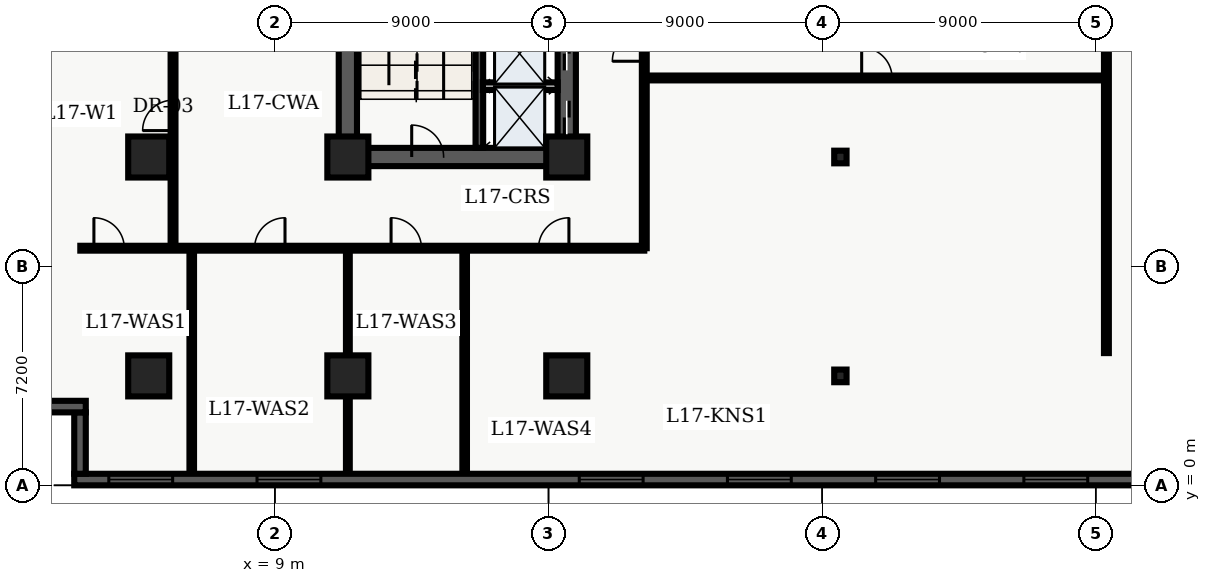
"""IFC4 building model, lengths in metres.
Left out: names, types, materials, properties, quantities, classifications, styles, units other than length and angle.
Written with IfcOpenShell. Run it as: python <this file> out.ifc"""

import sys

from ifc_helpers import new_model, entity, si_unit, converted_unit, direction, frame, origin_with_axes, origin_2d_with_axis, place, context, subcontext, project, spatial, polyline, rectangle, i_section, outline, extrude, element, fill, save


model = new_model("IFC4")
c1 = context("Model", 3, precision=1e-05, world=origin_with_axes(), true_north=direction((0.0, 1.0)))
c2 = subcontext(c1, "Body", "Model", "MODEL_VIEW")
j1 = project(units=[si_unit("LENGTHUNIT", "METRE"), converted_unit("PLANEANGLEUNIT", "DEGREE", entity("IfcPlaneAngleMeasure", 0.017), si_unit("PLANEANGLEUNIT", "RADIAN"), dimensions=[0, 0, 0, 0, 0, 0, 0])], contexts=[c1])
p1 = place(None, origin_with_axes())
s1 = spatial("IfcSite", under=j1, at=p1, CompositionType="ELEMENT")
p2 = place(p1, origin_with_axes())
s2 = spatial("IfcBuilding", under=s1, at=p2, CompositionType="ELEMENT")
p3 = place(p2, frame((0.0, 0.0, 71.7), z_axis=(0.0, 0.0, 1.0), x_axis=(1.0, 0.0, 0.0)))
s3 = spatial("IfcBuildingStorey", under=s2, at=p3, CompositionType="ELEMENT", Elevation=71.7)
p4 = place(p3, frame((11.4, 10.8, 0.0), z_axis=(0.0, 0.0, 1.0), x_axis=(0.0, 1.0, 0.0)))
e1 = element("IfcWall", 1, at=p4, inside=s3, PredefinedType="SHEAR", context=c2, shape_type="SweptSolid", body=[
    extrude(outline(polyline([(0.0, -0.3), (27.0, -0.3), (27.0, 0.3), (0.0, 0.3), (0.0, -0.3)])), origin_with_axes(), (0.0, 0.0, 1.0), 3.66),
])
p5 = place(p3, frame((11.4, 10.8, 0.0), z_axis=(0.0, 0.0, 1.0), x_axis=(1.0, 0.0, 0.0)))
e2 = element("IfcWall", 2, at=p5, inside=s3, PredefinedType="SHEAR", context=c2, shape_type="SweptSolid", body=[
    extrude(outline(polyline([(0.0, -0.3), (7.2, -0.3), (7.2, 0.3), (0.0, 0.3), (0.0, -0.3)])), origin_with_axes(), (0.0, 0.0, 1.0), 3.66),
])
p6 = place(p5, frame((2.625, 0.0, 0.0), z_axis=(0.0, 0.0, 1.0), x_axis=(1.0, 0.0, 0.0)))
e3 = element("IfcOpeningElement", 3, at=p6, cuts=e2, PredefinedType="OPENING", context=c2, shape_type="SweptSolid", body=[
    extrude(rectangle(XDim=1.05, YDim=0.62, at=origin_2d_with_axis()), origin_with_axes(), (0.0, 0.0, 1.0), 2.15),
])
p7 = place(p3, frame((18.6, 10.8, 0.0), z_axis=(0.0, 0.0, 1.0), x_axis=(0.0, 1.0, 0.0)))
e4 = element("IfcWall", 4, at=p7, inside=s3, PredefinedType="SHEAR", context=c2, shape_type="SweptSolid", body=[
    extrude(outline(polyline([(0.0, -0.3), (13.5, -0.3), (13.5, 0.3), (0.0, 0.3), (0.0, -0.3)])), origin_with_axes(), (0.0, 0.0, 1.0), 3.66),
])
p8 = place(p7, frame((1.3, 0.0, 0.0), z_axis=(0.0, 0.0, 1.0), x_axis=(1.0, 0.0, 0.0)))
e5 = element("IfcOpeningElement", 5, at=p8, cuts=e4, PredefinedType="OPENING", context=c2, shape_type="SweptSolid", body=[
    extrude(rectangle(XDim=1.1, YDim=0.62, at=origin_2d_with_axis()), origin_with_axes(), (0.0, 0.0, 1.0), 2.15),
])
p9 = place(p7, frame((3.4, 0.0, 0.0), z_axis=(0.0, 0.0, 1.0), x_axis=(1.0, 0.0, 0.0)))
e6 = element("IfcOpeningElement", 6, at=p9, cuts=e4, PredefinedType="OPENING", context=c2, shape_type="SweptSolid", body=[
    extrude(rectangle(XDim=1.1, YDim=0.62, at=origin_2d_with_axis()), origin_with_axes(), (0.0, 0.0, 1.0), 2.15),
])
p10 = place(p7, frame((11.125, 0.0, 0.0), z_axis=(0.0, 0.0, 1.0), x_axis=(1.0, 0.0, 0.0)))
e7 = element("IfcOpeningElement", 7, at=p10, cuts=e4, PredefinedType="OPENING", context=c2, shape_type="SweptSolid", body=[
    extrude(rectangle(XDim=1.05, YDim=0.62, at=origin_2d_with_axis()), origin_with_axes(), (0.0, 0.0, 1.0), 2.15),
])
p11 = place(p3, frame((15.725, 11.1, 0.0), z_axis=(0.0, 0.0, 1.0), x_axis=(0.0, 1.0, 0.0)))
e8 = element("IfcWall", 8, at=p11, inside=s3, PredefinedType="SHEAR", context=c2, shape_type="SweptSolid", body=[
    extrude(outline(polyline([(0.0, -0.125), (8.6, -0.125), (8.6, 0.125), (0.0, 0.125), (0.0, -0.125)])), origin_with_axes(), (0.0, 0.0, 1.0), 3.66),
])
for number, where, z_axis, x_axis in (
    (9, (11.4, 3.6, 0.0), (0.0, 0.0, 1.0), (1.0, 0.0, 0.0)),
    (10, (11.4, 10.8, 0.0), (0.0, 0.0, 1.0), (1.0, 0.0, 0.0)),
    (11, (18.6, 3.6, 0.0), (0.0, 0.0, 1.0), (1.0, 0.0, 0.0)),
    (12, (18.6, 10.8, 0.0), (0.0, 0.0, 1.0), (1.0, 0.0, 0.0)),
    (13, (4.85, 3.6, 0.0), (0.0, 0.0, 1.0), (1.0, 0.0, 0.0)),
    (14, (4.85, 10.8, 0.0), (0.0, 0.0, 1.0), (1.0, 0.0, 0.0)),
):
    element("IfcColumn", number, at=place(p3, frame(where, z_axis=z_axis, x_axis=x_axis)), inside=s3, PredefinedType="COLUMN", context=c2, shape_type="SweptSolid", body=[
        extrude(rectangle(XDim=1.35, YDim=1.35, at=origin_2d_with_axis()), origin_with_axes(), (0.0, 0.0, 1.0), 3.9),
    ])
for number, where, z_axis, x_axis in (
    (15, (27.6, 3.6, 0.0), (0.0, 0.0, 1.0), (1.0, 0.0, 0.0)),
    (16, (27.6, 10.8, 0.0), (0.0, 0.0, 1.0), (1.0, 0.0, 0.0)),
):
    element("IfcColumn", number, at=place(p3, frame(where, z_axis=z_axis, x_axis=x_axis)), inside=s3, PredefinedType="COLUMN", context=c2, shape_type="SweptSolid", body=[
        extrude(i_section(OverallWidth=0.406, OverallDepth=0.416, WebThickness=0.03, FlangeThickness=0.048, FilletRadius=0.022, at=origin_2d_with_axis()), origin_with_axes(), (0.0, 0.0, 1.0), 3.9),
    ])
p12 = place(p3, frame((15.84, 13.13, 0.0), z_axis=(0.0, 0.0, 1.0), x_axis=(1.0, 0.0, 0.0)))
e17 = element("IfcWall", 17, at=p12, inside=s3, PredefinedType="SOLIDWALL", context=c2, shape_type="SweptSolid", body=[
    extrude(outline(polyline([(0.0, -0.125), (2.46, -0.125), (2.46, 0.125), (0.0, 0.125), (0.0, -0.125)])), origin_with_axes(), (0.0, 0.0, 1.0), 2.7),
])
p13 = place(p3, frame((2.6, 7.8, 0.0), z_axis=(0.0, 0.0, 1.0), x_axis=(1.0, 0.0, 0.0)))
e18 = element("IfcWall", 18, at=p13, inside=s3, PredefinedType="PARTITIONING", context=c2, shape_type="SweptSolid", body=[
    extrude(outline(polyline([(0.0, -0.08), (18.55, -0.08), (18.55, 0.08), (0.0, 0.08), (0.0, -0.08)])), origin_with_axes(), (0.0, 0.0, 1.0), 2.7),
])
p14 = place(p13, frame((0.947, 0.0, 0.0), z_axis=(0.0, 0.0, 1.0), x_axis=(1.0, 0.0, 0.0)))
e19 = element("IfcOpeningElement", 19, at=p14, cuts=e18, PredefinedType="OPENING", context=c2, shape_type="SweptSolid", body=[
    extrude(rectangle(XDim=1.0, YDim=0.18, at=origin_2d_with_axis()), origin_with_axes(), (0.0, 0.0, 1.0), 2.15),
])
p15 = place(p13, frame((6.232, 0.0, 0.0), z_axis=(0.0, 0.0, 1.0), x_axis=(1.0, 0.0, 0.0)))
e20 = element("IfcOpeningElement", 20, at=p15, cuts=e18, PredefinedType="OPENING", context=c2, shape_type="SweptSolid", body=[
    extrude(rectangle(XDim=1.0, YDim=0.18, at=origin_2d_with_axis()), origin_with_axes(), (0.0, 0.0, 1.0), 2.15),
])
p16 = place(p13, frame((10.721, 0.0, 0.0), z_axis=(0.0, 0.0, 1.0), x_axis=(1.0, 0.0, 0.0)))
e21 = element("IfcOpeningElement", 21, at=p16, cuts=e18, PredefinedType="OPENING", context=c2, shape_type="SweptSolid", body=[
    extrude(rectangle(XDim=1.0, YDim=0.18, at=origin_2d_with_axis()), origin_with_axes(), (0.0, 0.0, 1.0), 2.15),
])
p17 = place(p13, frame((15.571, 0.0, 0.0), z_axis=(0.0, 0.0, 1.0), x_axis=(1.0, 0.0, 0.0)))
e22 = element("IfcOpeningElement", 22, at=p17, cuts=e18, PredefinedType="OPENING", context=c2, shape_type="SweptSolid", body=[
    extrude(rectangle(XDim=1.0, YDim=0.18, at=origin_2d_with_axis()), origin_with_axes(), (0.0, 0.0, 1.0), 2.15),
])
p18 = place(p3, frame((21.15, 7.8, 0.0), z_axis=(0.0, 0.0, 1.0), x_axis=(0.0, 1.0, 0.0)))
e23 = element("IfcWall", 23, at=p18, inside=s3, PredefinedType="PARTITIONING", context=c2, shape_type="SweptSolid", body=[
    extrude(outline(polyline([(0.0, -0.08), (32.7, -0.08), (32.7, 0.08), (0.0, 0.08), (0.0, -0.08)])), origin_with_axes(), (0.0, 0.0, 1.0), 2.7),
])
p19 = place(p18, frame((6.675, 0.0, 0.0), z_axis=(0.0, 0.0, 1.0), x_axis=(1.0, 0.0, 0.0)))
e24 = element("IfcOpeningElement", 24, at=p19, cuts=e23, PredefinedType="OPENING", context=c2, shape_type="SweptSolid", body=[
    extrude(rectangle(XDim=1.05, YDim=0.18, at=origin_2d_with_axis()), origin_with_axes(), (0.0, 0.0, 1.0), 2.15),
])
p20 = place(p3, frame((5.65, 7.8, 0.0), z_axis=(0.0, 0.0, 1.0), x_axis=(0.0, 1.0, 0.0)))
e25 = element("IfcWall", 25, at=p20, inside=s3, PredefinedType="PARTITIONING", context=c2, shape_type="SweptSolid", body=[
    extrude(outline(polyline([(0.0, -0.08), (32.7, -0.08), (32.7, 0.08), (0.0, 0.08), (0.0, -0.08)])), origin_with_axes(), (0.0, 0.0, 1.0), 2.7),
])
p21 = place(p20, frame((4.369, 0.0, 0.0), z_axis=(0.0, 0.0, 1.0), x_axis=(1.0, 0.0, 0.0)))
e26 = element("IfcOpeningElement", 26, at=p21, cuts=e25, PredefinedType="OPENING", context=c2, shape_type="SweptSolid", body=[
    extrude(rectangle(XDim=1.0, YDim=0.18, at=origin_2d_with_axis()), origin_with_axes(), (0.0, 0.0, 1.0), 2.15),
])
p22 = place(p20, frame((13.998, 0.0, 0.0), z_axis=(0.0, 0.0, 1.0), x_axis=(1.0, 0.0, 0.0)))
e27 = element("IfcOpeningElement", 27, at=p22, cuts=e25, PredefinedType="OPENING", context=c2, shape_type="SweptSolid", body=[
    extrude(rectangle(XDim=1.0, YDim=0.18, at=origin_2d_with_axis()), origin_with_axes(), (0.0, 0.0, 1.0), 2.15),
])
p23 = place(p20, frame((25.979, 0.0, 0.0), z_axis=(0.0, 0.0, 1.0), x_axis=(1.0, 0.0, 0.0)))
e28 = element("IfcOpeningElement", 28, at=p23, cuts=e25, PredefinedType="OPENING", context=c2, shape_type="SweptSolid", body=[
    extrude(rectangle(XDim=1.0, YDim=0.18, at=origin_2d_with_axis()), origin_with_axes(), (0.0, 0.0, 1.0), 2.15),
])
p24 = place(p3, frame((6.265, 0.36, 0.0), z_axis=(0.0, 0.0, 1.0), x_axis=(0.0, 1.0, 0.0)))
e29 = element("IfcWall", 29, at=p24, inside=s3, PredefinedType="PARTITIONING", context=c2, shape_type="SweptSolid", body=[
    extrude(outline(polyline([(0.0, -0.075), (7.34, -0.075), (7.34, 0.075), (0.0, 0.075), (0.0, -0.075)])), origin_with_axes(), (0.0, 0.0, 1.0), 2.7),
])
p25 = place(p3, frame((11.4, 0.36, 0.0), z_axis=(0.0, 0.0, 1.0), x_axis=(0.0, 1.0, 0.0)))
e30 = element("IfcWall", 30, at=p25, inside=s3, PredefinedType="PARTITIONING", context=c2, shape_type="SweptSolid", body=[
    extrude(outline(polyline([(0.0, -0.062), (7.34, -0.062), (7.34, 0.062), (0.0, 0.062), (0.0, -0.062)])), origin_with_axes(), (0.0, 0.0, 1.0), 2.7),
])
p26 = place(p3, frame((15.242, 0.36, 0.0), z_axis=(0.0, 0.0, 1.0), x_axis=(0.0, 1.0, 0.0)))
e31 = element("IfcWall", 31, at=p26, inside=s3, PredefinedType="PARTITIONING", context=c2, shape_type="SweptSolid", body=[
    extrude(outline(polyline([(0.0, -0.075), (7.34, -0.075), (7.34, 0.075), (0.0, 0.075), (0.0, -0.075)])), origin_with_axes(), (0.0, 0.0, 1.0), 2.7),
])
p27 = place(p3, frame((21.15, 13.4, 0.0), z_axis=(0.0, 0.0, 1.0), x_axis=(1.0, 0.0, 0.0)))
e32 = element("IfcWall", 32, at=p27, inside=s3, PredefinedType="PARTITIONING", context=c2, shape_type="SweptSolid", body=[
    extrude(outline(polyline([(0.0, -0.08), (15.2, -0.08), (15.2, 0.08), (0.0, 0.08), (0.0, -0.08)])), origin_with_axes(), (0.0, 0.0, 1.0), 2.7),
])
p28 = place(p27, frame((7.65, 0.0, 0.0), z_axis=(0.0, 0.0, 1.0), x_axis=(1.0, 0.0, 0.0)))
e33 = element("IfcOpeningElement", 33, at=p28, cuts=e32, PredefinedType="OPENING", context=c2, shape_type="SweptSolid", body=[
    extrude(rectangle(XDim=1.0, YDim=0.18, at=origin_2d_with_axis()), origin_with_axes(), (0.0, 0.0, 1.0), 2.15),
])
p29 = place(p3, frame((36.35, 4.35, 0.0), z_axis=(0.0, 0.0, 1.0), x_axis=(0.0, 1.0, 0.0)))
e34 = element("IfcWall", 34, at=p29, inside=s3, PredefinedType="PARTITIONING", context=c2, shape_type="SweptSolid", body=[
    extrude(outline(polyline([(0.0, -0.08), (16.95, -0.08), (16.95, 0.08), (0.0, 0.08), (0.0, -0.08)])), origin_with_axes(), (0.0, 0.0, 1.0), 2.7),
])
p30 = place(p3, frame((57.22, 0.19, 0.0), z_axis=(0.0, 0.0, 1.0), x_axis=(-1.0, 0.0, 0.0)))
e35 = element("IfcWall", 35, at=p30, inside=s3, PredefinedType="SOLIDWALL", context=c2, shape_type="SweptSolid", body=[
    extrude(outline(polyline([(0.0, -0.19), (54.82, -0.19), (54.82, 0.19), (0.0, 0.19), (0.0, -0.19)])), origin_with_axes(), (0.0, 0.0, 1.0), 3.66),
])
p31 = place(p30, frame((3.037, 0.0, 0.45), z_axis=(0.0, 0.0, 1.0), x_axis=(1.0, 0.0, 0.0)))
e36 = element("IfcOpeningElement", 36, at=p31, cuts=e35, PredefinedType="OPENING", context=c2, shape_type="SweptSolid", body=[
    extrude(rectangle(XDim=2.1, YDim=0.4, at=origin_2d_with_axis()), origin_with_axes(), (0.0, 0.0, 1.0), 2.2),
])
p32 = place(p30, frame((7.912, 0.0, 0.45), z_axis=(0.0, 0.0, 1.0), x_axis=(1.0, 0.0, 0.0)))
e37 = element("IfcOpeningElement", 37, at=p32, cuts=e35, PredefinedType="OPENING", context=c2, shape_type="SweptSolid", body=[
    extrude(rectangle(XDim=2.1, YDim=0.4, at=origin_2d_with_axis()), origin_with_axes(), (0.0, 0.0, 1.0), 2.2),
])
p33 = place(p30, frame((12.786, 0.0, 0.45), z_axis=(0.0, 0.0, 1.0), x_axis=(1.0, 0.0, 0.0)))
e38 = element("IfcOpeningElement", 38, at=p33, cuts=e35, PredefinedType="OPENING", context=c2, shape_type="SweptSolid", body=[
    extrude(rectangle(XDim=2.1, YDim=0.4, at=origin_2d_with_axis()), origin_with_axes(), (0.0, 0.0, 1.0), 2.2),
])
p34 = place(p30, frame((17.661, 0.0, 0.45), z_axis=(0.0, 0.0, 1.0), x_axis=(1.0, 0.0, 0.0)))
e39 = element("IfcOpeningElement", 39, at=p34, cuts=e35, PredefinedType="OPENING", context=c2, shape_type="SweptSolid", body=[
    extrude(rectangle(XDim=2.1, YDim=0.4, at=origin_2d_with_axis()), origin_with_axes(), (0.0, 0.0, 1.0), 2.2),
])
p35 = place(p30, frame((22.535, 0.0, 0.45), z_axis=(0.0, 0.0, 1.0), x_axis=(1.0, 0.0, 0.0)))
e40 = element("IfcOpeningElement", 40, at=p35, cuts=e35, PredefinedType="OPENING", context=c2, shape_type="SweptSolid", body=[
    extrude(rectangle(XDim=2.1, YDim=0.4, at=origin_2d_with_axis()), origin_with_axes(), (0.0, 0.0, 1.0), 2.2),
])
p36 = place(p30, frame((27.41, 0.0, 0.45), z_axis=(0.0, 0.0, 1.0), x_axis=(1.0, 0.0, 0.0)))
e41 = element("IfcOpeningElement", 41, at=p36, cuts=e35, PredefinedType="OPENING", context=c2, shape_type="SweptSolid", body=[
    extrude(rectangle(XDim=2.1, YDim=0.4, at=origin_2d_with_axis()), origin_with_axes(), (0.0, 0.0, 1.0), 2.2),
])
p37 = place(p30, frame((32.285, 0.0, 0.45), z_axis=(0.0, 0.0, 1.0), x_axis=(1.0, 0.0, 0.0)))
e42 = element("IfcOpeningElement", 42, at=p37, cuts=e35, PredefinedType="OPENING", context=c2, shape_type="SweptSolid", body=[
    extrude(rectangle(XDim=2.1, YDim=0.4, at=origin_2d_with_axis()), origin_with_axes(), (0.0, 0.0, 1.0), 2.2),
])
p38 = place(p30, frame((37.159, 0.0, 0.45), z_axis=(0.0, 0.0, 1.0), x_axis=(1.0, 0.0, 0.0)))
e43 = element("IfcOpeningElement", 43, at=p38, cuts=e35, PredefinedType="OPENING", context=c2, shape_type="SweptSolid", body=[
    extrude(rectangle(XDim=2.1, YDim=0.4, at=origin_2d_with_axis()), origin_with_axes(), (0.0, 0.0, 1.0), 2.2),
])
p39 = place(p30, frame((47.758, 0.0, 0.45), z_axis=(0.0, 0.0, 1.0), x_axis=(1.0, 0.0, 0.0)))
e44 = element("IfcOpeningElement", 44, at=p39, cuts=e35, PredefinedType="OPENING", context=c2, shape_type="SweptSolid", body=[
    extrude(rectangle(XDim=2.1, YDim=0.4, at=origin_2d_with_axis()), origin_with_axes(), (0.0, 0.0, 1.0), 2.2),
])
p40 = place(p30, frame((52.633, 0.0, 0.45), z_axis=(0.0, 0.0, 1.0), x_axis=(1.0, 0.0, 0.0)))
e45 = element("IfcOpeningElement", 45, at=p40, cuts=e35, PredefinedType="OPENING", context=c2, shape_type="SweptSolid", body=[
    extrude(rectangle(XDim=2.1, YDim=0.4, at=origin_2d_with_axis()), origin_with_axes(), (0.0, 0.0, 1.0), 2.2),
])
p41 = place(p3, frame((2.59, 0.38, 0.0), z_axis=(0.0, 0.0, 1.0), x_axis=(0.0, 1.0, 0.0)))
e46 = element("IfcWall", 46, at=p41, inside=s3, PredefinedType="SOLIDWALL", context=c2, shape_type="SweptSolid", body=[
    extrude(outline(polyline([(0.0, -0.19), (2.02, -0.19), (2.02, 0.19), (0.0, 0.19), (0.0, -0.19)])), origin_with_axes(), (0.0, 0.0, 1.0), 3.66),
])
p42 = place(p3, frame((2.78, 2.59, 0.0), z_axis=(0.0, 0.0, 1.0), x_axis=(-1.0, 0.0, 0.0)))
e47 = element("IfcWall", 47, at=p42, inside=s3, PredefinedType="SOLIDWALL", context=c2, shape_type="SweptSolid", body=[
    extrude(outline(polyline([(0.0, -0.19), (2.78, -0.19), (2.78, 0.19), (0.0, 0.19), (0.0, -0.19)])), origin_with_axes(), (0.0, 0.0, 1.0), 3.66),
])
p43 = place(p7, frame((1.3, 0.0, 0.0), z_axis=(0.0, 0.0, 1.0), x_axis=(1.0, 0.0, 0.0)))
e48 = element("IfcDoor", 48, at=p43, inside=s3, OperationType="SLIDING_TO_LEFT", PredefinedType="DOOR", context=c2, shape_type="SweptSolid", body=[
    extrude(rectangle(XDim=1.1, YDim=0.09, at=origin_2d_with_axis()), origin_with_axes(), (0.0, 0.0, 1.0), 2.15),
])
fill(e5, e48)
p44 = place(p7, frame((3.4, 0.0, 0.0), z_axis=(0.0, 0.0, 1.0), x_axis=(1.0, 0.0, 0.0)))
e49 = element("IfcDoor", 49, at=p44, inside=s3, OperationType="SLIDING_TO_RIGHT", PredefinedType="DOOR", context=c2, shape_type="SweptSolid", body=[
    extrude(rectangle(XDim=1.1, YDim=0.09, at=origin_2d_with_axis()), origin_with_axes(), (0.0, 0.0, 1.0), 2.15),
])
fill(e6, e49)
p45 = place(p5, frame((2.625, 0.0, 0.0), z_axis=(0.0, 0.0, 1.0), x_axis=(1.0, 0.0, 0.0)))
e50 = element("IfcDoor", 50, at=p45, inside=s3, OperationType="SINGLE_SWING_LEFT", PredefinedType="DOOR", context=c2, shape_type="SweptSolid", body=[
    extrude(rectangle(XDim=1.05, YDim=0.09, at=origin_2d_with_axis()), origin_with_axes(), (0.0, 0.0, 1.0), 2.15),
])
fill(e3, e50)
p46 = place(p20, frame((4.369, 0.0, 0.0), z_axis=(0.0, 0.0, 1.0), x_axis=(1.0, 0.0, 0.0)))
e51 = element("IfcDoor", 51, at=p46, inside=s3, OperationType="SINGLE_SWING_LEFT", PredefinedType="DOOR", context=c2, shape_type="SweptSolid", body=[
    extrude(rectangle(XDim=1.0, YDim=0.09, at=origin_2d_with_axis()), origin_with_axes(), (0.0, 0.0, 1.0), 2.15),
])
fill(e26, e51)
p47 = place(p13, frame((0.947, 0.0, 0.0), z_axis=(0.0, 0.0, 1.0), x_axis=(1.0, 0.0, 0.0)))
e52 = element("IfcDoor", 52, at=p47, inside=s3, OperationType="SINGLE_SWING_LEFT", PredefinedType="DOOR", context=c2, shape_type="SweptSolid", body=[
    extrude(rectangle(XDim=1.0, YDim=0.09, at=origin_2d_with_axis()), origin_with_axes(), (0.0, 0.0, 1.0), 2.15),
])
fill(e19, e52)
p48 = place(p13, frame((6.232, 0.0, 0.0), z_axis=(0.0, 0.0, 1.0), x_axis=(1.0, 0.0, 0.0)))
e53 = element("IfcDoor", 53, at=p48, inside=s3, OperationType="SINGLE_SWING_RIGHT", PredefinedType="DOOR", context=c2, shape_type="SweptSolid", body=[
    extrude(rectangle(XDim=1.0, YDim=0.09, at=origin_2d_with_axis()), origin_with_axes(), (0.0, 0.0, 1.0), 2.15),
])
fill(e20, e53)
p49 = place(p13, frame((10.721, 0.0, 0.0), z_axis=(0.0, 0.0, 1.0), x_axis=(1.0, 0.0, 0.0)))
e54 = element("IfcDoor", 54, at=p49, inside=s3, OperationType="SINGLE_SWING_LEFT", PredefinedType="DOOR", context=c2, shape_type="SweptSolid", body=[
    extrude(rectangle(XDim=1.0, YDim=0.09, at=origin_2d_with_axis()), origin_with_axes(), (0.0, 0.0, 1.0), 2.15),
])
fill(e21, e54)
p50 = place(p13, frame((15.571, 0.0, 0.0), z_axis=(0.0, 0.0, 1.0), x_axis=(1.0, 0.0, 0.0)))
e55 = element("IfcDoor", 55, at=p50, inside=s3, OperationType="SINGLE_SWING_RIGHT", PredefinedType="DOOR", context=c2, shape_type="SweptSolid", body=[
    extrude(rectangle(XDim=1.0, YDim=0.09, at=origin_2d_with_axis()), origin_with_axes(), (0.0, 0.0, 1.0), 2.15),
])
fill(e22, e55)
p51 = place(p18, frame((6.675, 0.0, 0.0), z_axis=(0.0, 0.0, 1.0), x_axis=(1.0, 0.0, 0.0)))
e56 = element("IfcDoor", 56, at=p51, inside=s3, OperationType="SINGLE_SWING_LEFT", PredefinedType="DOOR", context=c2, shape_type="SweptSolid", body=[
    extrude(rectangle(XDim=1.05, YDim=0.09, at=origin_2d_with_axis()), origin_with_axes(), (0.0, 0.0, 1.0), 2.15),
])
fill(e24, e56)
p52 = place(p27, frame((7.65, 0.0, 0.0), z_axis=(0.0, 0.0, 1.0), x_axis=(1.0, 0.0, 0.0)))
e57 = element("IfcDoor", 57, at=p52, inside=s3, OperationType="SINGLE_SWING_LEFT", PredefinedType="DOOR", context=c2, shape_type="SweptSolid", body=[
    extrude(rectangle(XDim=1.0, YDim=0.09, at=origin_2d_with_axis()), origin_with_axes(), (0.0, 0.0, 1.0), 2.15),
])
fill(e33, e57)
p53 = place(p30, frame((22.535, 0.0, 0.45), z_axis=(0.0, 0.0, 1.0), x_axis=(1.0, 0.0, 0.0)))
e58 = element("IfcWindow", 58, at=p53, inside=s3, PredefinedType="WINDOW", context=c2, shape_type="SweptSolid", body=[
    extrude(rectangle(XDim=2.1, YDim=0.09, at=origin_2d_with_axis()), origin_with_axes(), (0.0, 0.0, 1.0), 2.2),
])
fill(e40, e58)
p54 = place(p30, frame((27.41, 0.0, 0.45), z_axis=(0.0, 0.0, 1.0), x_axis=(1.0, 0.0, 0.0)))
e59 = element("IfcWindow", 59, at=p54, inside=s3, PredefinedType="WINDOW", context=c2, shape_type="SweptSolid", body=[
    extrude(rectangle(XDim=2.1, YDim=0.09, at=origin_2d_with_axis()), origin_with_axes(), (0.0, 0.0, 1.0), 2.2),
])
fill(e41, e59)
p55 = place(p30, frame((32.285, 0.0, 0.45), z_axis=(0.0, 0.0, 1.0), x_axis=(1.0, 0.0, 0.0)))
e60 = element("IfcWindow", 60, at=p55, inside=s3, PredefinedType="WINDOW", context=c2, shape_type="SweptSolid", body=[
    extrude(rectangle(XDim=2.1, YDim=0.09, at=origin_2d_with_axis()), origin_with_axes(), (0.0, 0.0, 1.0), 2.2),
])
fill(e42, e60)
p56 = place(p30, frame((37.159, 0.0, 0.45), z_axis=(0.0, 0.0, 1.0), x_axis=(1.0, 0.0, 0.0)))
e61 = element("IfcWindow", 61, at=p56, inside=s3, PredefinedType="WINDOW", context=c2, shape_type="SweptSolid", body=[
    extrude(rectangle(XDim=2.1, YDim=0.09, at=origin_2d_with_axis()), origin_with_axes(), (0.0, 0.0, 1.0), 2.2),
])
fill(e43, e61)
p57 = place(p30, frame((47.758, 0.0, 0.45), z_axis=(0.0, 0.0, 1.0), x_axis=(1.0, 0.0, 0.0)))
e62 = element("IfcWindow", 62, at=p57, inside=s3, PredefinedType="WINDOW", context=c2, shape_type="SweptSolid", body=[
    extrude(rectangle(XDim=2.1, YDim=0.09, at=origin_2d_with_axis()), origin_with_axes(), (0.0, 0.0, 1.0), 2.2),
])
fill(e44, e62)
p58 = place(p30, frame((52.633, 0.0, 0.45), z_axis=(0.0, 0.0, 1.0), x_axis=(1.0, 0.0, 0.0)))
e63 = element("IfcWindow", 63, at=p58, inside=s3, PredefinedType="WINDOW", context=c2, shape_type="SweptSolid", body=[
    extrude(rectangle(XDim=2.1, YDim=0.09, at=origin_2d_with_axis()), origin_with_axes(), (0.0, 0.0, 1.0), 2.2),
])
fill(e45, e63)
save(model, sys.argv[1])
